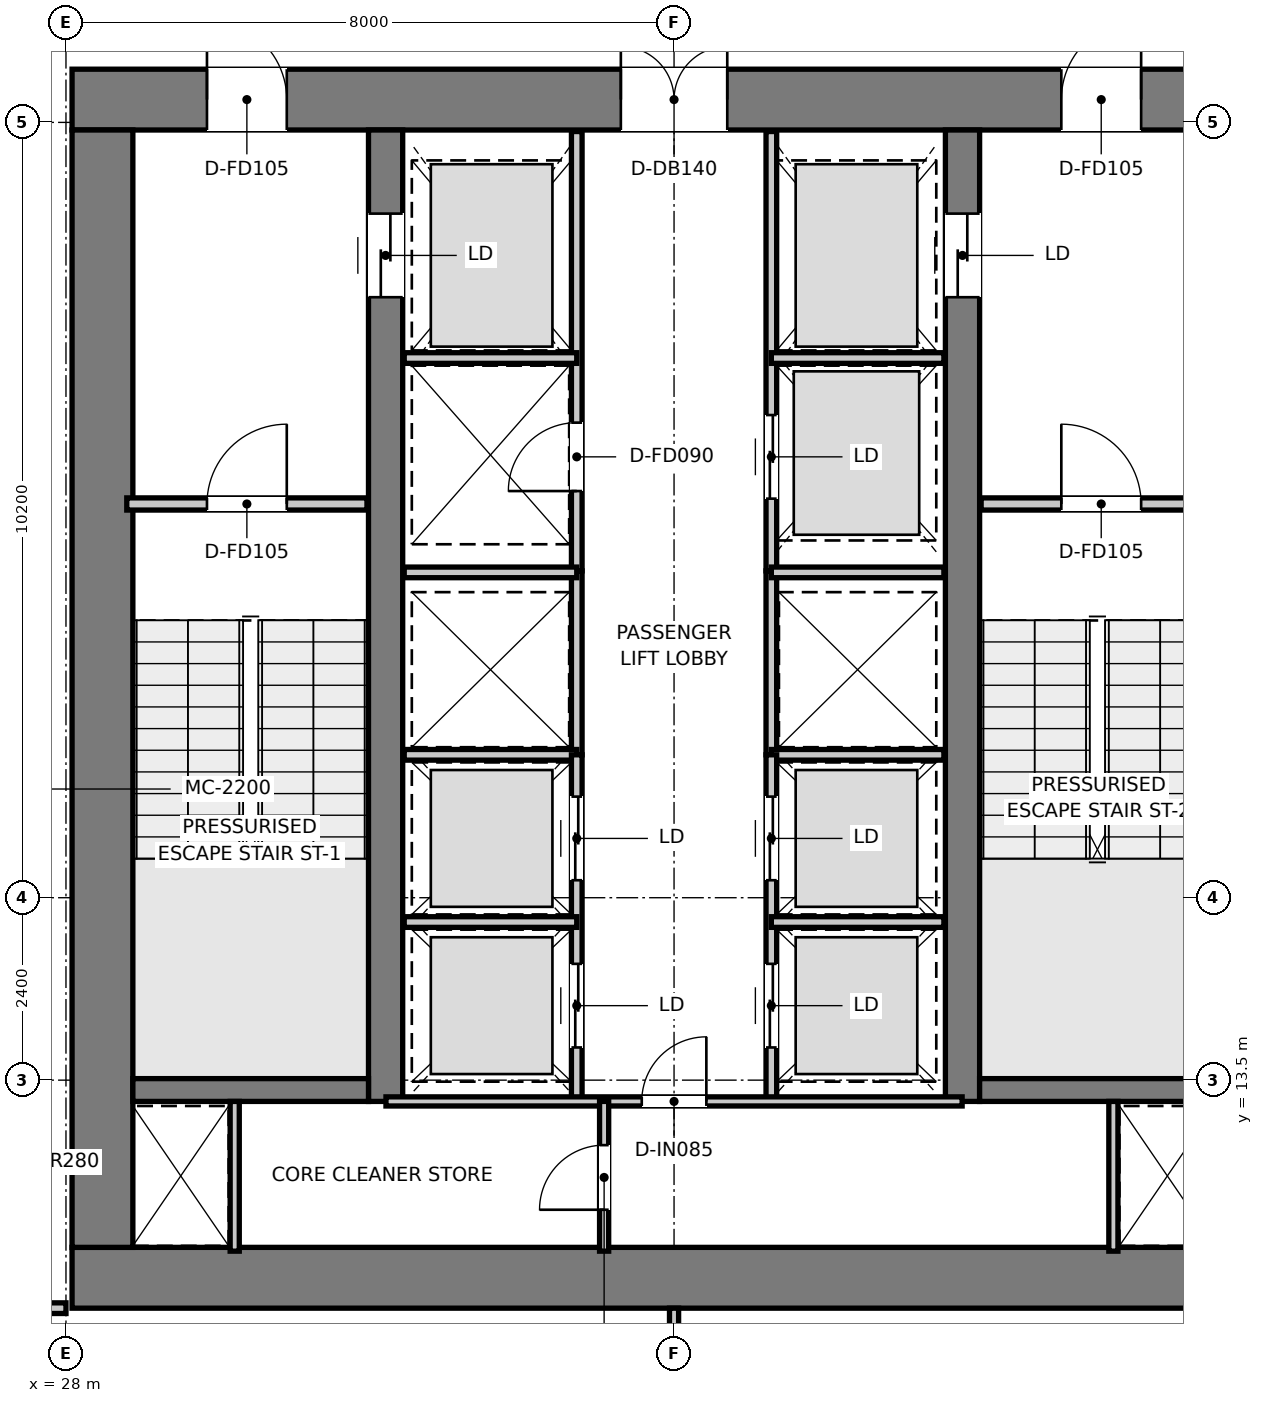
"""IFC4 building model, lengths in metres.
Left out: names, types, materials, properties, quantities, classifications, styles, units other than length and angle.
Written with IfcOpenShell. Run it as: python <this file> out.ifc"""

import sys

from ifc_helpers import new_model, si_unit, direction, frame, frame_2d, origin, place, context, subcontext, project, spatial, rectangle, extrude, element, fill, save


model = new_model("IFC4")
c1 = context("Model", 3, precision=1e-05, world=origin(), true_north=direction((0.0, 1.0)))
c2 = subcontext(c1, "Body", "Model", "MODEL_VIEW")
j1 = project(units=[si_unit("LENGTHUNIT", "METRE"), si_unit("PLANEANGLEUNIT", "RADIAN")], contexts=[c1])
p1 = place(None, origin())
s1 = spatial("IfcSite", under=j1, at=p1, CompositionType="ELEMENT")
p2 = place(p1, origin())
s2 = spatial("IfcBuilding", under=s1, at=p2, CompositionType="ELEMENT")
p3 = place(p2, frame((0.0, 0.0, 32.9)))
s3 = spatial("IfcBuildingStorey", under=s2, at=p3, CompositionType="ELEMENT", Elevation=32.9)
p4 = place(p3, frame((28.08, 10.9, 0.0), z_axis=(0.0, 0.0, 1.0), x_axis=(1.0, 0.0, 0.0)))
e1 = element("IfcWall", 1, at=p4, inside=s3, PredefinedType="SHEAR", context=c2, shape_type="SweptSolid", body=[
    extrude(rectangle(XDim=15.84, YDim=0.8, at=frame_2d((7.92, 0.0))), origin(), (0.0, 0.0, 1.0), 3.95),
])
p5 = place(p3, frame((28.08, 26.4, 0.0), z_axis=(0.0, 0.0, 1.0), x_axis=(1.0, 0.0, 0.0)))
e2 = element("IfcWall", 2, at=p5, inside=s3, PredefinedType="SHEAR", context=c2, shape_type="SweptSolid", body=[
    extrude(rectangle(XDim=15.84, YDim=0.8, at=frame_2d((7.92, 0.0))), origin(), (0.0, 0.0, 1.0), 3.95),
])
p6 = place(p5, frame((7.22, 0.0, 0.0)))
e3 = element("IfcOpeningElement", 3, at=p6, cuts=e2, PredefinedType="OPENING", context=c2, shape_type="SweptSolid", body=[
    extrude(rectangle(XDim=1.4, YDim=2.2, at=frame_2d((0.7, 1.1))), frame((0.0, 0.41, 0.0), z_axis=(0.0, -1.0, 0.0), x_axis=(1.0, 0.0, 0.0)), (0.0, 0.0, 1.0), 0.82),
])
p7 = place(p5, frame((1.775, 0.0, 0.0)))
e4 = element("IfcOpeningElement", 4, at=p7, cuts=e2, PredefinedType="OPENING", context=c2, shape_type="SweptSolid", body=[
    extrude(rectangle(XDim=1.05, YDim=2.1, at=frame_2d((0.525, 1.05))), frame((0.0, 0.41, 0.0), z_axis=(0.0, -1.0, 0.0), x_axis=(1.0, 0.0, 0.0)), (0.0, 0.0, 1.0), 0.82),
])
p8 = place(p5, frame((13.015, 0.0, 0.0)))
e5 = element("IfcOpeningElement", 5, at=p8, cuts=e2, PredefinedType="OPENING", context=c2, shape_type="SweptSolid", body=[
    extrude(rectangle(XDim=1.05, YDim=2.1, at=frame_2d((0.525, 1.05))), frame((0.0, 0.41, 0.0), z_axis=(0.0, -1.0, 0.0), x_axis=(1.0, 0.0, 0.0)), (0.0, 0.0, 1.0), 0.82),
])
p9 = place(p3, frame((28.48, 11.3, 0.0), z_axis=(0.0, 0.0, 1.0), x_axis=(0.0, 1.0, 0.0)))
e6 = element("IfcWall", 6, at=p9, inside=s3, PredefinedType="SHEAR", context=c2, shape_type="SweptSolid", body=[
    extrude(rectangle(XDim=14.7, YDim=0.8, at=frame_2d((7.35, 0.0))), origin(), (0.0, 0.0, 1.0), 3.95),
])
p10 = place(p3, frame((32.205, 13.22, 0.0), z_axis=(0.0, 0.0, 1.0), x_axis=(0.0, 1.0, 0.0)))
e7 = element("IfcWall", 7, at=p10, inside=s3, PredefinedType="SHEAR", context=c2, shape_type="SweptSolid", body=[
    extrude(rectangle(XDim=12.78, YDim=0.45, at=frame_2d((6.39, 0.0))), origin(), (0.0, 0.0, 1.0), 3.95),
])
p11 = place(p10, frame((10.58, 0.0, 0.0)))
e8 = element("IfcOpeningElement", 8, at=p11, cuts=e7, PredefinedType="OPENING", context=c2, shape_type="SweptSolid", body=[
    extrude(rectangle(XDim=1.1, YDim=2.15, at=frame_2d((0.55, 1.075))), frame((0.0, 0.235, 0.0), z_axis=(0.0, -1.0, 0.0), x_axis=(1.0, 0.0, 0.0)), (0.0, 0.0, 1.0), 0.47),
])
p12 = place(p3, frame((39.795, 13.22, 0.0), z_axis=(0.0, 0.0, 1.0), x_axis=(0.0, 1.0, 0.0)))
e9 = element("IfcWall", 9, at=p12, inside=s3, PredefinedType="SHEAR", context=c2, shape_type="SweptSolid", body=[
    extrude(rectangle(XDim=12.78, YDim=0.45, at=frame_2d((6.39, 0.0))), origin(), (0.0, 0.0, 1.0), 3.95),
])
p13 = place(p12, frame((10.58, 0.0, 0.0)))
e10 = element("IfcOpeningElement", 10, at=p13, cuts=e9, PredefinedType="OPENING", context=c2, shape_type="SweptSolid", body=[
    extrude(rectangle(XDim=1.1, YDim=2.15, at=frame_2d((0.55, 1.075))), frame((0.0, 0.235, 0.0), z_axis=(0.0, -1.0, 0.0), x_axis=(1.0, 0.0, 0.0)), (0.0, 0.0, 1.0), 0.47),
])
for number, where, z_axis, x_axis in (
    (11, (28.88, 13.37, 0.0), (0.0, 0.0, 1.0), (1.0, 0.0, 0.0)),
    (12, (40.02, 13.37, 0.0), (0.0, 0.0, 1.0), (1.0, 0.0, 0.0)),
):
    element("IfcWall", number, at=place(p3, frame(where, z_axis=z_axis, x_axis=x_axis)), inside=s3, PredefinedType="SHEAR", context=c2, shape_type="SweptSolid", body=[
        extrude(rectangle(XDim=3.1, YDim=0.3, at=frame_2d((1.55, 0.0))), origin(), (0.0, 0.0, 1.0), 3.95),
    ])
p14 = place(p3, frame((28.8, 21.08, 0.0), z_axis=(0.0, 0.0, 1.0), x_axis=(1.0, 0.0, 0.0)))
e13 = element("IfcWall", 13, at=p14, inside=s3, PredefinedType="PARTITIONING", context=c2, shape_type="SweptSolid", body=[
    extrude(rectangle(XDim=3.16, YDim=0.16, at=frame_2d((1.58, 0.0))), origin(), (0.0, 0.0, 1.0), 3.67),
])
p15 = place(p14, frame((1.055, 0.0, 0.0)))
e14 = element("IfcOpeningElement", 14, at=p15, cuts=e13, PredefinedType="OPENING", context=c2, shape_type="SweptSolid", body=[
    extrude(rectangle(XDim=1.05, YDim=2.1, at=frame_2d((0.525, 1.05))), frame((0.0, 0.09, 0.0), z_axis=(0.0, -1.0, 0.0), x_axis=(1.0, 0.0, 0.0)), (0.0, 0.0, 1.0), 0.18),
])
p16 = place(p3, frame((40.04, 21.08, 0.0), z_axis=(0.0, 0.0, 1.0), x_axis=(1.0, 0.0, 0.0)))
e15 = element("IfcWall", 15, at=p16, inside=s3, PredefinedType="PARTITIONING", context=c2, shape_type="SweptSolid", body=[
    extrude(rectangle(XDim=3.16, YDim=0.16, at=frame_2d((1.58, 0.0))), origin(), (0.0, 0.0, 1.0), 3.67),
])
p17 = place(p16, frame((1.055, 0.0, 0.0)))
e16 = element("IfcOpeningElement", 16, at=p17, cuts=e15, PredefinedType="OPENING", context=c2, shape_type="SweptSolid", body=[
    extrude(rectangle(XDim=1.05, YDim=2.1, at=frame_2d((0.525, 1.05))), frame((0.0, 0.09, 0.0), z_axis=(0.0, -1.0, 0.0), x_axis=(1.0, 0.0, 0.0)), (0.0, 0.0, 1.0), 0.18),
])
p18 = place(p3, frame((34.72, 20.2, 0.0), z_axis=(0.0, 0.0, 1.0), x_axis=(0.0, 1.0, 0.0)))
e17 = element("IfcWall", 17, at=p18, inside=s3, PredefinedType="PARTITIONING", context=c2, shape_type="SweptSolid", body=[
    extrude(rectangle(XDim=5.78, YDim=0.14, at=frame_2d((2.89, 0.0))), origin(), (0.0, 0.0, 1.0), 2.47),
])
p19 = place(p18, frame((1.05, 0.0, 0.0)))
e18 = element("IfcOpeningElement", 18, at=p19, cuts=e17, PredefinedType="OPENING", context=c2, shape_type="SweptSolid", body=[
    extrude(rectangle(XDim=0.9, YDim=2.1, at=frame_2d((0.45, 1.05))), frame((0.0, 0.08, 0.0), z_axis=(0.0, -1.0, 0.0), x_axis=(1.0, 0.0, 0.0)), (0.0, 0.0, 1.0), 0.16),
])
p20 = place(p3, frame((37.28, 20.2, 0.0), z_axis=(0.0, 0.0, 1.0), x_axis=(0.0, 1.0, 0.0)))
e19 = element("IfcWall", 19, at=p20, inside=s3, PredefinedType="PARTITIONING", context=c2, shape_type="SweptSolid", body=[
    extrude(rectangle(XDim=5.78, YDim=0.14, at=frame_2d((2.89, 0.0))), origin(), (0.0, 0.0, 1.0), 2.47),
])
p21 = place(p20, frame((0.95, 0.0, 0.0)))
e20 = element("IfcOpeningElement", 20, at=p21, cuts=e19, PredefinedType="OPENING", context=c2, shape_type="SweptSolid", body=[
    extrude(rectangle(XDim=1.1, YDim=2.15, at=frame_2d((0.55, 1.075))), frame((0.0, 0.08, 0.0), z_axis=(0.0, -1.0, 0.0), x_axis=(1.0, 0.0, 0.0)), (0.0, 0.0, 1.0), 0.16),
])
for number, where, z_axis, x_axis in (
    (21, (32.45, 23.0, 0.0), (0.0, 0.0, 1.0), (1.0, 0.0, 0.0)),
    (22, (37.28, 23.0, 0.0), (0.0, 0.0, 1.0), (1.0, 0.0, 0.0)),
):
    element("IfcWall", number, at=place(p3, frame(where, z_axis=z_axis, x_axis=x_axis)), inside=s3, PredefinedType="PARTITIONING", context=c2, shape_type="SweptSolid", body=[
        extrude(rectangle(XDim=2.27, YDim=0.14, at=frame_2d((1.135, 0.0))), origin(), (0.0, 0.0, 1.0), 2.47),
    ])
for number, where, z_axis, x_axis in (
    (23, (34.72, 17.78, 0.0), (0.0, 0.0, 1.0), (0.0, 1.0, 0.0)),
    (24, (37.28, 17.78, 0.0), (0.0, 0.0, 1.0), (0.0, 1.0, 0.0)),
):
    element("IfcWall", number, at=place(p3, frame(where, z_axis=z_axis, x_axis=x_axis)), inside=s3, PredefinedType="PARTITIONING", context=c2, shape_type="SweptSolid", body=[
        extrude(rectangle(XDim=2.42, YDim=0.14, at=frame_2d((1.21, 0.0))), origin(), (0.0, 0.0, 1.0), 3.67),
    ])
for number, where, z_axis, x_axis in (
    (25, (32.45, 17.78, 0.0), (0.0, 0.0, 1.0), (1.0, 0.0, 0.0)),
    (26, (32.45, 20.18, 0.0), (0.0, 0.0, 1.0), (1.0, 0.0, 0.0)),
    (27, (37.28, 17.78, 0.0), (0.0, 0.0, 1.0), (1.0, 0.0, 0.0)),
    (28, (37.28, 20.18, 0.0), (0.0, 0.0, 1.0), (1.0, 0.0, 0.0)),
):
    element("IfcWall", number, at=place(p3, frame(where, z_axis=z_axis, x_axis=x_axis)), inside=s3, PredefinedType="PARTITIONING", context=c2, shape_type="SweptSolid", body=[
        extrude(rectangle(XDim=2.27, YDim=0.14, at=frame_2d((1.135, 0.0))), origin(), (0.0, 0.0, 1.0), 3.67),
    ])
p22 = place(p3, frame((34.72, 13.22, 0.0), z_axis=(0.0, 0.0, 1.0), x_axis=(0.0, 1.0, 0.0)))
e29 = element("IfcWall", 29, at=p22, inside=s3, PredefinedType="PARTITIONING", context=c2, shape_type="SweptSolid", body=[
    extrude(rectangle(XDim=4.56, YDim=0.14, at=frame_2d((2.28, 0.0))), origin(), (0.0, 0.0, 1.0), 3.67),
])
p23 = place(p22, frame((0.71, 0.0, 0.0)))
e30 = element("IfcOpeningElement", 30, at=p23, cuts=e29, PredefinedType="OPENING", context=c2, shape_type="SweptSolid", body=[
    extrude(rectangle(XDim=1.1, YDim=2.15, at=frame_2d((0.55, 1.075))), frame((0.0, 0.08, 0.0), z_axis=(0.0, -1.0, 0.0), x_axis=(1.0, 0.0, 0.0)), (0.0, 0.0, 1.0), 0.16),
])
p24 = place(p22, frame((2.91, 0.0, 0.0)))
e31 = element("IfcOpeningElement", 31, at=p24, cuts=e29, PredefinedType="OPENING", context=c2, shape_type="SweptSolid", body=[
    extrude(rectangle(XDim=1.1, YDim=2.15, at=frame_2d((0.55, 1.075))), frame((0.0, 0.08, 0.0), z_axis=(0.0, -1.0, 0.0), x_axis=(1.0, 0.0, 0.0)), (0.0, 0.0, 1.0), 0.16),
])
p25 = place(p3, frame((32.45, 15.58, 0.0), z_axis=(0.0, 0.0, 1.0), x_axis=(1.0, 0.0, 0.0)))
e32 = element("IfcWall", 32, at=p25, inside=s3, PredefinedType="PARTITIONING", context=c2, shape_type="SweptSolid", body=[
    extrude(rectangle(XDim=2.27, YDim=0.14, at=frame_2d((1.135, 0.0))), origin(), (0.0, 0.0, 1.0), 3.67),
])
p26 = place(p3, frame((37.28, 13.22, 0.0), z_axis=(0.0, 0.0, 1.0), x_axis=(0.0, 1.0, 0.0)))
e33 = element("IfcWall", 33, at=p26, inside=s3, PredefinedType="PARTITIONING", context=c2, shape_type="SweptSolid", body=[
    extrude(rectangle(XDim=4.56, YDim=0.14, at=frame_2d((2.28, 0.0))), origin(), (0.0, 0.0, 1.0), 3.67),
])
p27 = place(p26, frame((0.71, 0.0, 0.0)))
e34 = element("IfcOpeningElement", 34, at=p27, cuts=e33, PredefinedType="OPENING", context=c2, shape_type="SweptSolid", body=[
    extrude(rectangle(XDim=1.1, YDim=2.15, at=frame_2d((0.55, 1.075))), frame((0.0, 0.08, 0.0), z_axis=(0.0, -1.0, 0.0), x_axis=(1.0, 0.0, 0.0)), (0.0, 0.0, 1.0), 0.16),
])
p28 = place(p26, frame((2.91, 0.0, 0.0)))
e35 = element("IfcOpeningElement", 35, at=p28, cuts=e33, PredefinedType="OPENING", context=c2, shape_type="SweptSolid", body=[
    extrude(rectangle(XDim=1.1, YDim=2.15, at=frame_2d((0.55, 1.075))), frame((0.0, 0.08, 0.0), z_axis=(0.0, -1.0, 0.0), x_axis=(1.0, 0.0, 0.0)), (0.0, 0.0, 1.0), 0.16),
])
p29 = place(p3, frame((37.28, 15.58, 0.0), z_axis=(0.0, 0.0, 1.0), x_axis=(1.0, 0.0, 0.0)))
e36 = element("IfcWall", 36, at=p29, inside=s3, PredefinedType="PARTITIONING", context=c2, shape_type="SweptSolid", body=[
    extrude(rectangle(XDim=2.27, YDim=0.14, at=frame_2d((1.135, 0.0))), origin(), (0.0, 0.0, 1.0), 3.67),
])
for number, where, z_axis, x_axis in (
    (37, (30.22, 11.25, 0.0), (0.0, 0.0, 1.0), (0.0, 1.0, 0.0)),
    (38, (41.78, 11.25, 0.0), (0.0, 0.0, 1.0), (0.0, 1.0, 0.0)),
):
    element("IfcWall", number, at=place(p3, frame(where, z_axis=z_axis, x_axis=x_axis)), inside=s3, PredefinedType="PARTITIONING", context=c2, shape_type="SweptSolid", body=[
        extrude(rectangle(XDim=1.97, YDim=0.12, at=frame_2d((0.985, 0.0))), origin(), (0.0, 0.0, 1.0), 3.67),
    ])
p30 = place(p3, frame((32.21, 13.22, 0.0), z_axis=(0.0, 0.0, 1.0), x_axis=(1.0, 0.0, 0.0)))
e39 = element("IfcWall", 39, at=p30, inside=s3, PredefinedType="PARTITIONING", context=c2, shape_type="SweptSolid", body=[
    extrude(rectangle(XDim=7.58, YDim=0.12, at=frame_2d((3.79, 0.0))), origin(), (0.0, 0.0, 1.0), 3.67),
])
p31 = place(p30, frame((3.365, 0.0, 0.0)))
e40 = element("IfcOpeningElement", 40, at=p31, cuts=e39, PredefinedType="OPENING", context=c2, shape_type="SweptSolid", body=[
    extrude(rectangle(XDim=0.85, YDim=2.1, at=frame_2d((0.425, 1.05))), frame((0.0, 0.07, 0.0), z_axis=(0.0, -1.0, 0.0), x_axis=(1.0, 0.0, 0.0)), (0.0, 0.0, 1.0), 0.14),
])
p32 = place(p3, frame((35.08, 11.25, 0.0), z_axis=(0.0, 0.0, 1.0), x_axis=(0.0, 1.0, 0.0)))
e41 = element("IfcWall", 41, at=p32, inside=s3, PredefinedType="PARTITIONING", context=c2, shape_type="SweptSolid", body=[
    extrude(rectangle(XDim=1.97, YDim=0.12, at=frame_2d((0.985, 0.0))), origin(), (0.0, 0.0, 1.0), 3.67),
])
p33 = place(p32, frame((0.545, 0.0, 0.0)))
e42 = element("IfcOpeningElement", 42, at=p33, cuts=e41, PredefinedType="OPENING", context=c2, shape_type="SweptSolid", body=[
    extrude(rectangle(XDim=0.85, YDim=2.1, at=frame_2d((0.425, 1.05))), frame((0.0, 0.07, 0.0), z_axis=(0.0, -1.0, 0.0), x_axis=(1.0, 0.0, 0.0)), (0.0, 0.0, 1.0), 0.14),
])
p34 = place(p3, frame((26.32, 10.5, 0.0), z_axis=(0.0, 0.0, 1.0), x_axis=(1.0, 0.0, 0.0)))
e43 = element("IfcWall", 43, at=p34, inside=s3, PredefinedType="PARTITIONING", context=c2, shape_type="SweptSolid", body=[
    extrude(rectangle(XDim=1.68, YDim=0.14, at=frame_2d((0.84, 0.0))), origin(), (0.0, 0.0, 1.0), 3.67),
])
p35 = place(p34, frame((0.445, 0.0, 0.0)))
e44 = element("IfcOpeningElement", 44, at=p35, cuts=e43, PredefinedType="OPENING", context=c2, shape_type="SweptSolid", body=[
    extrude(rectangle(XDim=0.85, YDim=2.1, at=frame_2d((0.425, 1.05))), frame((0.0, 0.08, 0.0), z_axis=(0.0, -1.0, 0.0), x_axis=(1.0, 0.0, 0.0)), (0.0, 0.0, 1.0), 0.16),
])
p36 = place(p3, frame((36.0, 1.79, 0.0), z_axis=(0.0, 0.0, 1.0), x_axis=(0.0, 1.0, 0.0)))
e45 = element("IfcWall", 45, at=p36, inside=s3, PredefinedType="PARTITIONING", context=c2, shape_type="SweptSolid", body=[
    extrude(rectangle(XDim=8.71, YDim=0.12, at=frame_2d((4.355, 0.0))), origin(), (0.0, 0.0, 1.0), 3.67),
])
p37 = place(p15, origin())
e46 = element("IfcDoor", 46, at=p37, inside=s3, OperationType="SINGLE_SWING_RIGHT", PredefinedType="DOOR", context=c2, shape_type="SweptSolid", body=[
    extrude(rectangle(XDim=1.05, YDim=2.1, at=frame_2d((0.525, 1.05))), frame((0.0, 0.025, 0.0), z_axis=(0.0, -1.0, 0.0), x_axis=(1.0, 0.0, 0.0)), (0.0, 0.0, 1.0), 0.05),
])
fill(e14, e46)
p38 = place(p17, origin())
e47 = element("IfcDoor", 47, at=p38, inside=s3, OperationType="SINGLE_SWING_LEFT", PredefinedType="DOOR", context=c2, shape_type="SweptSolid", body=[
    extrude(rectangle(XDim=1.05, YDim=2.1, at=frame_2d((0.525, 1.05))), frame((0.0, 0.025, 0.0), z_axis=(0.0, -1.0, 0.0), x_axis=(1.0, 0.0, 0.0)), (0.0, 0.0, 1.0), 0.05),
])
fill(e16, e47)
p39 = place(p6, origin())
e48 = element("IfcDoor", 48, at=p39, inside=s3, OperationType="DOUBLE_DOOR_SINGLE_SWING", PredefinedType="DOOR", context=c2, shape_type="SweptSolid", body=[
    extrude(rectangle(XDim=1.4, YDim=2.2, at=frame_2d((0.7, 1.1))), frame((0.0, 0.025, 0.0), z_axis=(0.0, -1.0, 0.0), x_axis=(1.0, 0.0, 0.0)), (0.0, 0.0, 1.0), 0.05),
])
fill(e3, e48)
p40 = place(p7, origin())
e49 = element("IfcDoor", 49, at=p40, inside=s3, OperationType="SINGLE_SWING_LEFT", PredefinedType="DOOR", context=c2, shape_type="SweptSolid", body=[
    extrude(rectangle(XDim=1.05, YDim=2.1, at=frame_2d((0.525, 1.05))), frame((0.0, 0.025, 0.0), z_axis=(0.0, -1.0, 0.0), x_axis=(1.0, 0.0, 0.0)), (0.0, 0.0, 1.0), 0.05),
])
fill(e4, e49)
p41 = place(p8, origin())
e50 = element("IfcDoor", 50, at=p41, inside=s3, OperationType="SINGLE_SWING_RIGHT", PredefinedType="DOOR", context=c2, shape_type="SweptSolid", body=[
    extrude(rectangle(XDim=1.05, YDim=2.1, at=frame_2d((0.525, 1.05))), frame((0.0, 0.025, 0.0), z_axis=(0.0, -1.0, 0.0), x_axis=(1.0, 0.0, 0.0)), (0.0, 0.0, 1.0), 0.05),
])
fill(e5, e50)
p42 = place(p11, origin())
e51 = element("IfcDoor", 51, at=p42, inside=s3, OperationType="DOUBLE_DOOR_SLIDING", PredefinedType="DOOR", context=c2, shape_type="SweptSolid", body=[
    extrude(rectangle(XDim=1.1, YDim=2.15, at=frame_2d((0.55, 1.075))), frame((0.0, 0.025, 0.0), z_axis=(0.0, -1.0, 0.0), x_axis=(1.0, 0.0, 0.0)), (0.0, 0.0, 1.0), 0.05),
])
fill(e8, e51)
p43 = place(p13, origin())
e52 = element("IfcDoor", 52, at=p43, inside=s3, OperationType="DOUBLE_DOOR_SLIDING", PredefinedType="DOOR", context=c2, shape_type="SweptSolid", body=[
    extrude(rectangle(XDim=1.1, YDim=2.15, at=frame_2d((0.55, 1.075))), frame((0.0, 0.025, 0.0), z_axis=(0.0, -1.0, 0.0), x_axis=(1.0, 0.0, 0.0)), (0.0, 0.0, 1.0), 0.05),
])
fill(e10, e52)
p44 = place(p19, origin())
e53 = element("IfcDoor", 53, at=p44, inside=s3, OperationType="SINGLE_SWING_LEFT", PredefinedType="DOOR", context=c2, shape_type="SweptSolid", body=[
    extrude(rectangle(XDim=0.9, YDim=2.1, at=frame_2d((0.45, 1.05))), frame((0.0, 0.025, 0.0), z_axis=(0.0, -1.0, 0.0), x_axis=(1.0, 0.0, 0.0)), (0.0, 0.0, 1.0), 0.05),
])
fill(e18, e53)
p45 = place(p21, origin())
e54 = element("IfcDoor", 54, at=p45, inside=s3, OperationType="DOUBLE_DOOR_SLIDING", PredefinedType="DOOR", context=c2, shape_type="SweptSolid", body=[
    extrude(rectangle(XDim=1.1, YDim=2.15, at=frame_2d((0.55, 1.075))), frame((0.0, 0.025, 0.0), z_axis=(0.0, -1.0, 0.0), x_axis=(1.0, 0.0, 0.0)), (0.0, 0.0, 1.0), 0.05),
])
fill(e20, e54)
p46 = place(p23, origin())
e55 = element("IfcDoor", 55, at=p46, inside=s3, OperationType="DOUBLE_DOOR_SLIDING", PredefinedType="DOOR", context=c2, shape_type="SweptSolid", body=[
    extrude(rectangle(XDim=1.1, YDim=2.15, at=frame_2d((0.55, 1.075))), frame((0.0, 0.025, 0.0), z_axis=(0.0, -1.0, 0.0), x_axis=(1.0, 0.0, 0.0)), (0.0, 0.0, 1.0), 0.05),
])
fill(e30, e55)
p47 = place(p24, origin())
e56 = element("IfcDoor", 56, at=p47, inside=s3, OperationType="DOUBLE_DOOR_SLIDING", PredefinedType="DOOR", context=c2, shape_type="SweptSolid", body=[
    extrude(rectangle(XDim=1.1, YDim=2.15, at=frame_2d((0.55, 1.075))), frame((0.0, 0.025, 0.0), z_axis=(0.0, -1.0, 0.0), x_axis=(1.0, 0.0, 0.0)), (0.0, 0.0, 1.0), 0.05),
])
fill(e31, e56)
p48 = place(p27, origin())
e57 = element("IfcDoor", 57, at=p48, inside=s3, OperationType="DOUBLE_DOOR_SLIDING", PredefinedType="DOOR", context=c2, shape_type="SweptSolid", body=[
    extrude(rectangle(XDim=1.1, YDim=2.15, at=frame_2d((0.55, 1.075))), frame((0.0, 0.025, 0.0), z_axis=(0.0, -1.0, 0.0), x_axis=(1.0, 0.0, 0.0)), (0.0, 0.0, 1.0), 0.05),
])
fill(e34, e57)
p49 = place(p28, origin())
e58 = element("IfcDoor", 58, at=p49, inside=s3, OperationType="DOUBLE_DOOR_SLIDING", PredefinedType="DOOR", context=c2, shape_type="SweptSolid", body=[
    extrude(rectangle(XDim=1.1, YDim=2.15, at=frame_2d((0.55, 1.075))), frame((0.0, 0.025, 0.0), z_axis=(0.0, -1.0, 0.0), x_axis=(1.0, 0.0, 0.0)), (0.0, 0.0, 1.0), 0.05),
])
fill(e35, e58)
p50 = place(p31, origin())
e59 = element("IfcDoor", 59, at=p50, inside=s3, OperationType="SINGLE_SWING_RIGHT", PredefinedType="DOOR", context=c2, shape_type="SweptSolid", body=[
    extrude(rectangle(XDim=0.85, YDim=2.1, at=frame_2d((0.425, 1.05))), frame((0.0, 0.025, 0.0), z_axis=(0.0, -1.0, 0.0), x_axis=(1.0, 0.0, 0.0)), (0.0, 0.0, 1.0), 0.05),
])
fill(e40, e59)
p51 = place(p33, origin())
e60 = element("IfcDoor", 60, at=p51, inside=s3, OperationType="SINGLE_SWING_LEFT", PredefinedType="DOOR", context=c2, shape_type="SweptSolid", body=[
    extrude(rectangle(XDim=0.85, YDim=2.1, at=frame_2d((0.425, 1.05))), frame((0.0, 0.025, 0.0), z_axis=(0.0, -1.0, 0.0), x_axis=(1.0, 0.0, 0.0)), (0.0, 0.0, 1.0), 0.05),
])
fill(e42, e60)
save(model, sys.argv[1])
